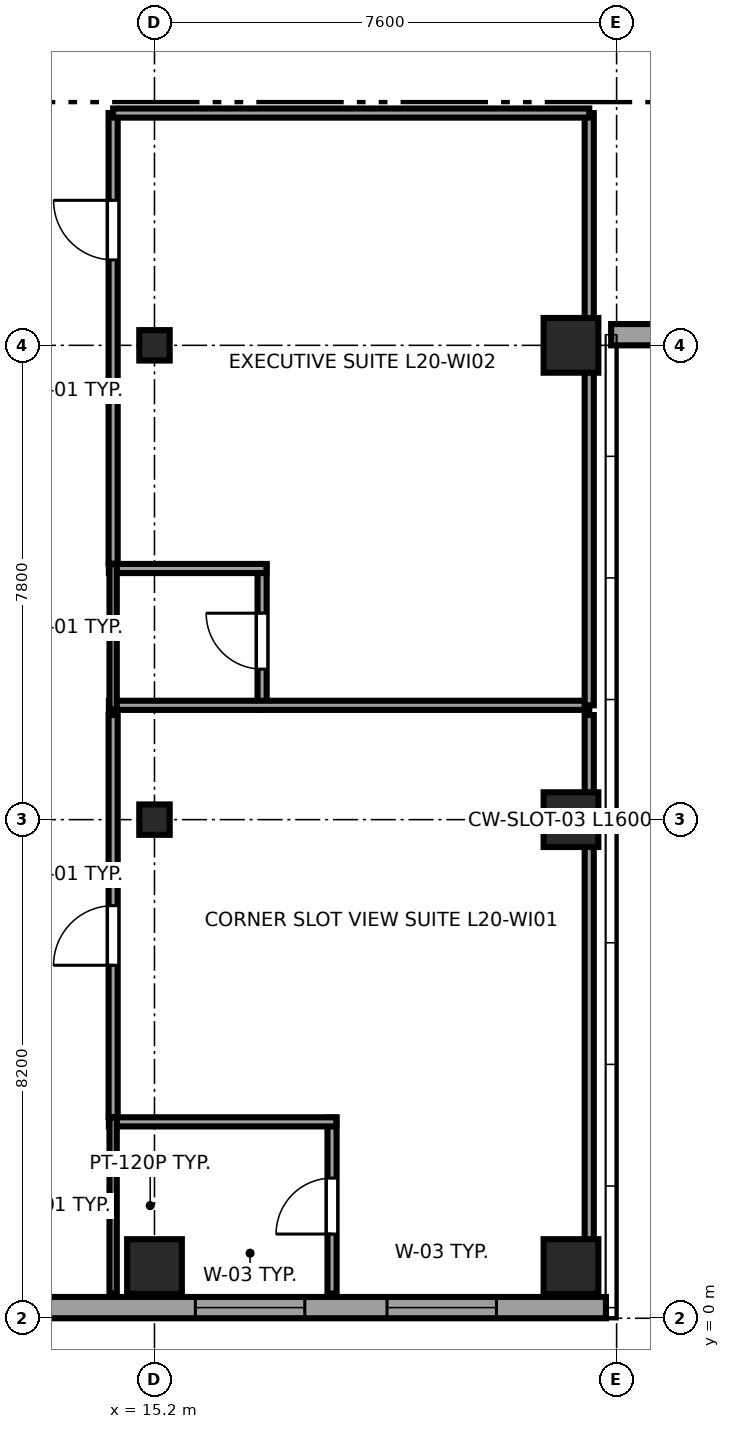
"""IFC4 building model, lengths in metres.
Left out: names, types, materials, properties, quantities, classifications, styles, units other than length and angle.
Written with IfcOpenShell. Run it as: python <this file> out.ifc"""

import sys

from ifc_helpers import new_model, si_unit, direction, frame, frame_2d, origin, origin_2d, place, context, subcontext, project, spatial, rectangle, i_section, extrude, source, transform, mapped, element, fill, save


model = new_model("IFC4")
c1 = context("Model", 3, precision=1e-05, world=origin(), true_north=direction((0.0, 1.0)))
c2 = subcontext(c1, "Body", "Model", "MODEL_VIEW")
j1 = project(units=[si_unit("LENGTHUNIT", "METRE"), si_unit("PLANEANGLEUNIT", "RADIAN")], contexts=[c1])
p1 = place(None, origin())
s1 = spatial("IfcSite", under=j1, at=p1, CompositionType="ELEMENT")
p2 = place(p1, origin())
s2 = spatial("IfcBuilding", under=s1, at=p2, CompositionType="ELEMENT")
p3 = place(p2, frame((0.0, 0.0, 81.7)))
s3 = spatial("IfcBuildingStorey", under=s2, at=p3, CompositionType="ELEMENT", Elevation=81.7)
m1 = source(origin(), c2, "Body", "SweptSolid", [
    extrude(rectangle(XDim=0.9, YDim=0.9, at=origin_2d()), origin(), (0.0, 0.0, 1.0), 3.55),
])
p4 = place(p3, frame((15.2, 0.85, 0.0), z_axis=(0.0, 0.0, 1.0), x_axis=(1.0, 0.0, 0.0)))
e1 = element("IfcColumn", 1, at=p4, inside=s3, PredefinedType="COLUMN", context=c2, shape_type="MappedRepresentation", body=[
    mapped(m1, transform((0.0, 0.0, 0.0), x_axis=(1.0, 0.0, 0.0), y_axis=(0.0, 1.0, 0.0), z_axis=(0.0, 0.0, 1.0), scale=1.0)),
])
m2 = source(origin(), c2, "Body", "SweptSolid", [
    extrude(i_section(OverallWidth=0.5, OverallDepth=0.5, WebThickness=0.022, FlangeThickness=0.034, at=origin_2d()), origin(), (0.0, 0.0, 1.0), 3.55),
])
for number, where, z_axis, x_axis in (
    (2, (15.2, 8.2, 0.0), (0.0, 0.0, 1.0), (1.0, 0.0, 0.0)),
    (3, (15.2, 16.0, 0.0), (0.0, 0.0, 1.0), (1.0, 0.0, 0.0)),
):
    element("IfcColumn", number, at=place(p3, frame(where, z_axis=z_axis, x_axis=x_axis)), inside=s3, PredefinedType="COLUMN", context=c2, shape_type="MappedRepresentation", body=[
        mapped(m2, transform((0.0, 0.0, 0.0), x_axis=(1.0, 0.0, 0.0), y_axis=(0.0, 1.0, 0.0), z_axis=(0.0, 0.0, 1.0), scale=1.0)),
    ])
for number, where, z_axis, x_axis in (
    (4, (22.05, 0.85, 0.0), (0.0, 0.0, 1.0), (1.0, 0.0, 0.0)),
    (5, (22.05, 8.2, 0.0), (0.0, 0.0, 1.0), (1.0, 0.0, 0.0)),
    (6, (22.05, 16.0, 0.0), (0.0, 0.0, 1.0), (1.0, 0.0, 0.0)),
):
    element("IfcColumn", number, at=place(p3, frame(where, z_axis=z_axis, x_axis=x_axis)), inside=s3, PredefinedType="COLUMN", context=c2, shape_type="MappedRepresentation", body=[
        mapped(m1, transform((0.0, 0.0, 0.0), x_axis=(1.0, 0.0, 0.0), y_axis=(0.0, 1.0, 0.0), z_axis=(0.0, 0.0, 1.0), scale=1.0)),
    ])
p5 = place(p3, frame((4.617, 0.175, 0.0), z_axis=(0.0, 0.0, 1.0), x_axis=(1.0, 0.0, 0.0)))
e7 = element("IfcWall", 7, at=p5, inside=s3, PredefinedType="SOLIDWALL", context=c2, shape_type="SweptSolid", body=[
    extrude(rectangle(XDim=18.008, YDim=0.35, at=frame_2d((9.004, 0.0))), origin(), (0.0, 0.0, 1.0), 3.37),
])
p6 = place(p5, frame((5.453, 0.0, 0.68)))
e8 = element("IfcOpeningElement", 8, at=p6, cuts=e7, PredefinedType="OPENING", context=c2, shape_type="SweptSolid", body=[
    extrude(rectangle(XDim=1.8, YDim=1.85, at=frame_2d((0.9, 0.925))), frame((0.0, 0.185, 0.0), z_axis=(0.0, -1.0, 0.0), x_axis=(1.0, 0.0, 0.0)), (0.0, 0.0, 1.0), 0.37),
])
p7 = place(p5, frame((11.255, 0.0, 0.68)))
e9 = element("IfcOpeningElement", 9, at=p7, cuts=e7, PredefinedType="OPENING", context=c2, shape_type="SweptSolid", body=[
    extrude(rectangle(XDim=1.8, YDim=1.85, at=frame_2d((0.9, 0.925))), frame((0.0, 0.185, 0.0), z_axis=(0.0, -1.0, 0.0), x_axis=(1.0, 0.0, 0.0)), (0.0, 0.0, 1.0), 0.37),
])
p8 = place(p5, frame((14.407, 0.0, 0.68)))
e10 = element("IfcOpeningElement", 10, at=p8, cuts=e7, PredefinedType="OPENING", context=c2, shape_type="SweptSolid", body=[
    extrude(rectangle(XDim=1.8, YDim=1.85, at=frame_2d((0.9, 0.925))), frame((0.0, 0.185, 0.0), z_axis=(0.0, -1.0, 0.0), x_axis=(1.0, 0.0, 0.0)), (0.0, 0.0, 1.0), 0.37),
])
p9 = place(p3, frame((22.71, 16.175, 0.0), z_axis=(0.0, 0.0, 1.0), x_axis=(1.0, 0.0, 0.0)))
e11 = element("IfcWall", 11, at=p9, inside=s3, PredefinedType="SOLIDWALL", context=c2, shape_type="SweptSolid", body=[
    extrude(rectangle(XDim=11.58, YDim=0.35, at=frame_2d((5.79, 0.0))), origin(), (0.0, 0.0, 1.0), 2.748),
])
p10 = place(p9, frame((2.295, 0.0, 0.68)))
e12 = element("IfcOpeningElement", 12, at=p10, cuts=e11, PredefinedType="OPENING", context=c2, shape_type="SweptSolid", body=[
    extrude(rectangle(XDim=1.8, YDim=1.85, at=frame_2d((0.9, 0.925))), frame((0.0, 0.185, 0.0), z_axis=(0.0, -1.0, 0.0), x_axis=(1.0, 0.0, 0.0)), (0.0, 0.0, 1.0), 0.37),
])
p11 = place(p9, frame((7.485, 0.0, 0.68)))
e13 = element("IfcOpeningElement", 13, at=p11, cuts=e11, PredefinedType="OPENING", context=c2, shape_type="SweptSolid", body=[
    extrude(rectangle(XDim=1.8, YDim=1.85, at=frame_2d((0.9, 0.925))), frame((0.0, 0.185, 0.0), z_axis=(0.0, -1.0, 0.0), x_axis=(1.0, 0.0, 0.0)), (0.0, 0.0, 1.0), 0.37),
])
p12 = place(p3, frame((18.12, 0.405, 0.0), z_axis=(0.0, 0.0, 1.0), x_axis=(0.0, 1.0, 0.0)))
e14 = element("IfcWall", 14, at=p12, inside=s3, PredefinedType="PARTITIONING", context=c2, shape_type="SweptSolid", body=[
    extrude(rectangle(XDim=2.895, YDim=0.15, at=frame_2d((1.448, 0.0))), origin(), (0.0, 0.0, 1.0), 3.37),
])
p13 = place(p12, frame((0.98, 0.0, 0.0)))
e15 = element("IfcOpeningElement", 15, at=p13, cuts=e14, PredefinedType="OPENING", context=c2, shape_type="SweptSolid", body=[
    extrude(rectangle(XDim=0.92, YDim=2.01, at=frame_2d((0.46, 1.005))), frame((0.0, 0.085, 0.0), z_axis=(0.0, -1.0, 0.0), x_axis=(1.0, 0.0, 0.0)), (0.0, 0.0, 1.0), 0.17),
])
p14 = place(p3, frame((14.45, 3.23, 0.0), z_axis=(0.0, 0.0, 1.0), x_axis=(1.0, 0.0, 0.0)))
e16 = element("IfcWall", 16, at=p14, inside=s3, PredefinedType="PARTITIONING", context=c2, shape_type="SweptSolid", body=[
    extrude(rectangle(XDim=3.74, YDim=0.15, at=frame_2d((1.87, 0.0))), origin(), (0.0, 0.0, 1.0), 3.37),
])
p15 = place(p3, frame((14.52, 0.405, 0.0), z_axis=(0.0, 0.0, 1.0), x_axis=(0.0, 1.0, 0.0)))
e17 = element("IfcWall", 17, at=p15, inside=s3, PredefinedType="PLUMBINGWALL", context=c2, shape_type="SweptSolid", body=[
    extrude(rectangle(XDim=2.895, YDim=0.12, at=frame_2d((1.448, 0.0))), origin(), (0.0, 0.0, 1.0), 3.37),
])
p16 = place(p3, frame((16.97, 10.01, 0.0), z_axis=(0.0, 0.0, 1.0), x_axis=(0.0, 1.0, 0.0)))
e18 = element("IfcWall", 18, at=p16, inside=s3, PredefinedType="PARTITIONING", context=c2, shape_type="SweptSolid", body=[
    extrude(rectangle(XDim=2.39, YDim=0.15, at=frame_2d((1.195, 0.0))), origin(), (0.0, 0.0, 1.0), 3.37),
])
p17 = place(p16, frame((0.665, 0.0, 0.0)))
e19 = element("IfcOpeningElement", 19, at=p17, cuts=e18, PredefinedType="OPENING", context=c2, shape_type="SweptSolid", body=[
    extrude(rectangle(XDim=0.92, YDim=2.01, at=frame_2d((0.46, 1.005))), frame((0.0, 0.085, 0.0), z_axis=(0.0, -1.0, 0.0), x_axis=(1.0, 0.0, 0.0)), (0.0, 0.0, 1.0), 0.17),
])
p18 = place(p3, frame((14.45, 10.08, 0.0), z_axis=(0.0, 0.0, 1.0), x_axis=(1.0, 0.0, 0.0)))
e20 = element("IfcWall", 20, at=p18, inside=s3, PredefinedType="PARTITIONING", context=c2, shape_type="SweptSolid", body=[
    extrude(rectangle(XDim=7.9, YDim=0.15, at=frame_2d((3.95, 0.0))), origin(), (0.0, 0.0, 1.0), 3.37),
])
p19 = place(p3, frame((14.45, 12.33, 0.0), z_axis=(0.0, 0.0, 1.0), x_axis=(1.0, 0.0, 0.0)))
e21 = element("IfcWall", 21, at=p19, inside=s3, PredefinedType="PARTITIONING", context=c2, shape_type="SweptSolid", body=[
    extrude(rectangle(XDim=2.59, YDim=0.15, at=frame_2d((1.295, 0.0))), origin(), (0.0, 0.0, 1.0), 3.37),
])
p20 = place(p3, frame((14.52, 10.01, 0.0), z_axis=(0.0, 0.0, 1.0), x_axis=(0.0, 1.0, 0.0)))
e22 = element("IfcWall", 22, at=p20, inside=s3, PredefinedType="PLUMBINGWALL", context=c2, shape_type="SweptSolid", body=[
    extrude(rectangle(XDim=2.39, YDim=0.12, at=frame_2d((1.195, 0.0))), origin(), (0.0, 0.0, 1.0), 3.37),
])
p21 = place(p3, frame((14.52, 3.31, 0.0), z_axis=(0.0, 0.0, 1.0), x_axis=(0.0, 1.0, 0.0)))
e23 = element("IfcWall", 23, at=p21, inside=s3, PredefinedType="PARTITIONING", context=c2, shape_type="SweptSolid", body=[
    extrude(rectangle(XDim=6.61, YDim=0.15, at=frame_2d((3.305, 0.0))), origin(), (0.0, 0.0, 1.0), 3.37),
])
p22 = place(p21, frame((2.495, 0.0, 0.0)))
e24 = element("IfcOpeningElement", 24, at=p22, cuts=e23, PredefinedType="OPENING", context=c2, shape_type="SweptSolid", body=[
    extrude(rectangle(XDim=0.98, YDim=2.12, at=frame_2d((0.49, 1.06))), frame((0.0, 0.085, 0.0), z_axis=(0.0, -1.0, 0.0), x_axis=(1.0, 0.0, 0.0)), (0.0, 0.0, 1.0), 0.17),
])
p23 = place(p3, frame((22.35, 0.405, 0.0), z_axis=(0.0, 0.0, 1.0), x_axis=(0.0, 1.0, 0.0)))
e25 = element("IfcWall", 25, at=p23, inside=s3, PredefinedType="PARTITIONING", context=c2, shape_type="SweptSolid", body=[
    extrude(rectangle(XDim=9.515, YDim=0.15, at=frame_2d((4.757, 0.0))), origin(), (0.0, 0.0, 1.0), 3.37),
])
p24 = place(p3, frame((14.52, 12.41, 0.0), z_axis=(0.0, 0.0, 1.0), x_axis=(0.0, 1.0, 0.0)))
e26 = element("IfcWall", 26, at=p24, inside=s3, PredefinedType="PARTITIONING", context=c2, shape_type="SweptSolid", body=[
    extrude(rectangle(XDim=7.41, YDim=0.15, at=frame_2d((3.705, 0.0))), origin(), (0.0, 0.0, 1.0), 3.37),
])
p25 = place(p24, frame((4.995, 0.0, 0.0)))
e27 = element("IfcOpeningElement", 27, at=p25, cuts=e26, PredefinedType="OPENING", context=c2, shape_type="SweptSolid", body=[
    extrude(rectangle(XDim=0.98, YDim=2.12, at=frame_2d((0.49, 1.06))), frame((0.0, 0.085, 0.0), z_axis=(0.0, -1.0, 0.0), x_axis=(1.0, 0.0, 0.0)), (0.0, 0.0, 1.0), 0.17),
])
p26 = place(p3, frame((22.35, 10.08, 0.0), z_axis=(0.0, 0.0, 1.0), x_axis=(0.0, 1.0, 0.0)))
e28 = element("IfcWall", 28, at=p26, inside=s3, PredefinedType="PARTITIONING", context=c2, shape_type="SweptSolid", body=[
    extrude(rectangle(XDim=9.74, YDim=0.15, at=frame_2d((4.87, 0.0))), origin(), (0.0, 0.0, 1.0), 3.37),
])
p27 = place(p3, frame((14.52, 19.82, 0.0), z_axis=(0.0, 0.0, 1.0), x_axis=(1.0, 0.0, 0.0)))
e29 = element("IfcWall", 29, at=p27, inside=s3, PredefinedType="PARTITIONING", context=c2, shape_type="SweptSolid", body=[
    extrude(rectangle(XDim=7.83, YDim=0.15, at=frame_2d((3.915, 0.0))), origin(), (0.0, 0.0, 1.0), 3.37),
])
m3 = source(origin(), c2, "Body", "SweptSolid", [
    extrude(rectangle(XDim=1.8, YDim=1.85, at=frame_2d((0.9, 0.925))), frame((0.0, 0.09, 0.0), z_axis=(0.0, -1.0, 0.0), x_axis=(1.0, 0.0, 0.0)), (0.0, 0.0, 1.0), 0.06),
])
p28 = place(p7, origin())
e30 = element("IfcWindow", 30, at=p28, inside=s3, PartitioningType="TRIPLE_PANEL_HORIZONTAL", PredefinedType="WINDOW", context=c2, shape_type="MappedRepresentation", body=[
    mapped(m3, transform((0.0, 0.0, 0.0), x_axis=(1.0, 0.0, 0.0), y_axis=(0.0, 1.0, 0.0), z_axis=(0.0, 0.0, 1.0), scale=1.0)),
])
fill(e9, e30)
p29 = place(p8, origin())
e31 = element("IfcWindow", 31, at=p29, inside=s3, PartitioningType="TRIPLE_PANEL_HORIZONTAL", PredefinedType="WINDOW", context=c2, shape_type="MappedRepresentation", body=[
    mapped(m3, transform((0.0, 0.0, 0.0), x_axis=(1.0, 0.0, 0.0), y_axis=(0.0, 1.0, 0.0), z_axis=(0.0, 0.0, 1.0), scale=1.0)),
])
fill(e10, e31)
m4 = source(origin(), c2, "Body", "SweptSolid", [
    extrude(rectangle(XDim=0.92, YDim=2.01, at=frame_2d((0.46, 1.005))), frame((0.0, 0.025, 0.0), z_axis=(0.0, -1.0, 0.0), x_axis=(1.0, 0.0, 0.0)), (0.0, 0.0, 1.0), 0.05),
])
p30 = place(p13, origin())
e32 = element("IfcDoor", 32, at=p30, inside=s3, OperationType="SINGLE_SWING_LEFT", PredefinedType="DOOR", context=c2, shape_type="MappedRepresentation", body=[
    mapped(m4, transform((0.0, 0.0, 0.0), x_axis=(1.0, 0.0, 0.0), y_axis=(0.0, 1.0, 0.0), z_axis=(0.0, 0.0, 1.0), scale=1.0)),
])
fill(e15, e32)
p31 = place(p17, origin())
e33 = element("IfcDoor", 33, at=p31, inside=s3, OperationType="SINGLE_SWING_RIGHT", PredefinedType="DOOR", context=c2, shape_type="MappedRepresentation", body=[
    mapped(m4, transform((0.0, 0.0, 0.0), x_axis=(1.0, 0.0, 0.0), y_axis=(0.0, 1.0, 0.0), z_axis=(0.0, 0.0, 1.0), scale=1.0)),
])
fill(e19, e33)
m5 = source(origin(), c2, "Body", "SweptSolid", [
    extrude(rectangle(XDim=0.98, YDim=2.12, at=frame_2d((0.49, 1.06))), frame((0.0, 0.025, 0.0), z_axis=(0.0, -1.0, 0.0), x_axis=(1.0, 0.0, 0.0)), (0.0, 0.0, 1.0), 0.05),
])
p32 = place(p22, origin())
e34 = element("IfcDoor", 34, at=p32, inside=s3, OperationType="SINGLE_SWING_LEFT", PredefinedType="DOOR", context=c2, shape_type="MappedRepresentation", body=[
    mapped(m5, transform((0.0, 0.0, 0.0), x_axis=(1.0, 0.0, 0.0), y_axis=(0.0, 1.0, 0.0), z_axis=(0.0, 0.0, 1.0), scale=1.0)),
])
fill(e24, e34)
p33 = place(p25, origin())
e35 = element("IfcDoor", 35, at=p33, inside=s3, OperationType="SINGLE_SWING_RIGHT", PredefinedType="DOOR", context=c2, shape_type="MappedRepresentation", body=[
    mapped(m5, transform((0.0, 0.0, 0.0), x_axis=(1.0, 0.0, 0.0), y_axis=(0.0, 1.0, 0.0), z_axis=(0.0, 0.0, 1.0), scale=1.0)),
])
fill(e27, e35)
save(model, sys.argv[1])
